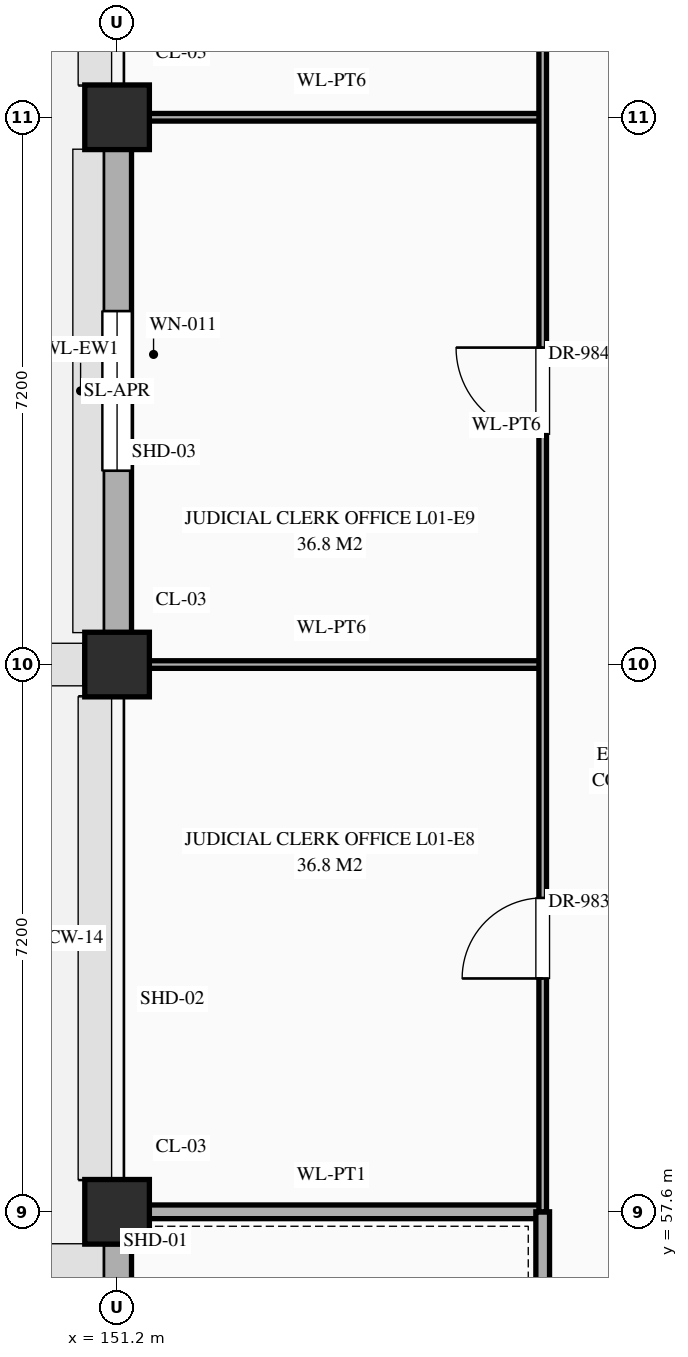
"""IFC4 building model, lengths in metres.
Left out: names, types, materials, properties, quantities, classifications, styles, units other than length and angle.
Written with IfcOpenShell. Run it as: python <this file> out.ifc"""

import sys

from ifc_helpers import new_model, si_unit, direction, frame, frame_2d, origin, origin_2d, place, context, subcontext, project, spatial, rectangle, extrude, element, fill, save


model = new_model("IFC4")
c1 = context("Model", 3, precision=1e-05, world=origin(), true_north=direction((0.0, 1.0)))
c2 = subcontext(c1, "Body", "Model", "MODEL_VIEW")
j1 = project(units=[si_unit("LENGTHUNIT", "METRE"), si_unit("PLANEANGLEUNIT", "RADIAN")], contexts=[c1])
p1 = place(None, origin())
s1 = spatial("IfcSite", under=j1, at=p1, CompositionType="ELEMENT")
p2 = place(p1, origin())
s2 = spatial("IfcBuilding", under=s1, at=p2, CompositionType="ELEMENT")
p3 = place(p2, origin())
s3 = spatial("IfcBuildingStorey", under=s2, at=p3, CompositionType="ELEMENT", Elevation=0.0)
for number, where, z_axis, x_axis in (
    (1, (151.2, 57.6, 0.0), (0.0, 0.0, 1.0), (1.0, 0.0, 0.0)),
    (2, (151.2, 64.8, 0.0), (0.0, 0.0, 1.0), (1.0, 0.0, 0.0)),
    (3, (151.2, 72.0, 0.0), (0.0, 0.0, 1.0), (1.0, 0.0, 0.0)),
):
    element("IfcColumn", number, at=place(p3, frame(where, z_axis=z_axis, x_axis=x_axis)), inside=s3, PredefinedType="COLUMN", context=c2, shape_type="SweptSolid", body=[
        extrude(rectangle(XDim=0.85, YDim=0.85, at=origin_2d()), origin(), (0.0, 0.0, 1.0), 5.4),
    ])
p4 = place(p3, frame((151.2, 50.82, 0.0), z_axis=(0.0, 0.0, 1.0), x_axis=(0.0, 1.0, 0.0)))
e4 = element("IfcWall", 4, at=p4, inside=s3, PredefinedType="STANDARD", context=c2, shape_type="SweptSolid", body=[
    extrude(rectangle(XDim=6.36, YDim=0.38, at=frame_2d((3.18, 0.0))), origin(), (0.0, 0.0, 1.0), 4.47),
])
p5 = place(p4, frame((1.98, 0.0, 0.0)))
e5 = element("IfcOpeningElement", 5, at=p5, cuts=e4, PredefinedType="OPENING", context=c2, shape_type="SweptSolid", body=[
    extrude(rectangle(XDim=2.4, YDim=2.4, at=frame_2d((1.2, 1.2))), frame((0.0, 0.202, 0.0), z_axis=(0.0, -1.0, 0.0), x_axis=(1.0, 0.0, 0.0)), (0.0, 0.0, 1.0), 0.404),
])
p6 = place(p3, frame((151.2, 65.22, 0.0), z_axis=(0.0, 0.0, 1.0), x_axis=(0.0, 1.0, 0.0)))
e6 = element("IfcWall", 6, at=p6, inside=s3, PredefinedType="STANDARD", context=c2, shape_type="SweptSolid", body=[
    extrude(rectangle(XDim=6.36, YDim=0.38, at=frame_2d((3.18, 0.0))), origin(), (0.0, 0.0, 1.0), 4.47),
])
p7 = place(p6, frame((2.13, 0.0, 0.85)))
e7 = element("IfcOpeningElement", 7, at=p7, cuts=e6, PredefinedType="OPENING", context=c2, shape_type="SweptSolid", body=[
    extrude(rectangle(XDim=2.1, YDim=1.2, at=frame_2d((1.05, 0.6))), frame((0.0, 0.202, 0.0), z_axis=(0.0, -1.0, 0.0), x_axis=(1.0, 0.0, 0.0)), (0.0, 0.0, 1.0), 0.404),
])
p8 = place(p3, frame((101.25, 64.8, 0.0), z_axis=(0.0, 0.0, 1.0), x_axis=(1.0, 0.0, 0.0)))
e8 = element("IfcWall", 8, at=p8, inside=s3, PredefinedType="STANDARD", context=c2, shape_type="SweptSolid", body=[
    extrude(rectangle(XDim=49.5, YDim=0.28, at=frame_2d((24.75, 0.0))), origin(), (0.0, 0.0, 1.0), 2.85),
])
p9 = place(p8, frame((13.95, 0.0, 0.0)))
e9 = element("IfcOpeningElement", 9, at=p9, cuts=e8, PredefinedType="OPENING", context=c2, shape_type="SweptSolid", body=[
    extrude(rectangle(XDim=2.4, YDim=2.25, at=frame_2d((1.2, 1.125))), frame((0.0, 0.152, 0.0), z_axis=(0.0, -1.0, 0.0), x_axis=(1.0, 0.0, 0.0)), (0.0, 0.0, 1.0), 0.304),
])
p10 = place(p8, frame((33.15, 0.0, 0.0)))
e10 = element("IfcOpeningElement", 10, at=p10, cuts=e8, PredefinedType="OPENING", context=c2, shape_type="SweptSolid", body=[
    extrude(rectangle(XDim=2.4, YDim=2.25, at=frame_2d((1.2, 1.125))), frame((0.0, 0.152, 0.0), z_axis=(0.0, -1.0, 0.0), x_axis=(1.0, 0.0, 0.0)), (0.0, 0.0, 1.0), 0.304),
])
p11 = place(p3, frame((151.24, 57.6, 0.0), z_axis=(0.0, 0.0, 1.0), x_axis=(1.0, 0.0, 0.0)))
e11 = element("IfcWall", 11, at=p11, inside=s3, PredefinedType="STANDARD", context=c2, shape_type="SweptSolid", body=[
    extrude(rectangle(XDim=5.56, YDim=0.18, at=frame_2d((2.78, 0.0))), origin(), (0.0, 0.0, 1.0), 4.27),
])
for number, where, z_axis, x_axis in (
    (12, (151.24, 64.8, 0.0), (0.0, 0.0, 1.0), (1.0, 0.0, 0.0)),
    (13, (151.24, 72.0, 0.0), (0.0, 0.0, 1.0), (1.0, 0.0, 0.0)),
):
    element("IfcWall", number, at=place(p3, frame(where, z_axis=z_axis, x_axis=x_axis)), inside=s3, PredefinedType="STANDARD", context=c2, shape_type="SweptSolid", body=[
        extrude(rectangle(XDim=5.56, YDim=0.1, at=frame_2d((2.78, 0.0))), origin(), (0.0, 0.0, 1.0), 4.27),
    ])
p12 = place(p3, frame((156.8, 43.2, 0.0), z_axis=(0.0, 0.0, 1.0), x_axis=(0.0, 1.0, 0.0)))
e14 = element("IfcWall", 14, at=p12, inside=s3, PredefinedType="STANDARD", context=c2, shape_type="SweptSolid", body=[
    extrude(rectangle(XDim=14.4, YDim=0.18, at=frame_2d((7.2, 0.0))), origin(), (0.0, 0.0, 1.0), 5.12),
])
p13 = place(p12, frame((2.875, 0.0, 0.0)))
e15 = element("IfcOpeningElement", 15, at=p13, cuts=e14, PredefinedType="OPENING", context=c2, shape_type="SweptSolid", body=[
    extrude(rectangle(XDim=1.45, YDim=2.3, at=frame_2d((0.725, 1.15))), frame((0.0, 0.102, 0.0), z_axis=(0.0, -1.0, 0.0), x_axis=(1.0, 0.0, 0.0)), (0.0, 0.0, 1.0), 0.204),
])
p14 = place(p12, frame((9.85, 0.0, 0.0)))
e16 = element("IfcOpeningElement", 16, at=p14, cuts=e14, PredefinedType="OPENING", context=c2, shape_type="SweptSolid", body=[
    extrude(rectangle(XDim=1.9, YDim=2.5, at=frame_2d((0.95, 1.25))), frame((0.0, 0.102, 0.0), z_axis=(0.0, -1.0, 0.0), x_axis=(1.0, 0.0, 0.0)), (0.0, 0.0, 1.0), 0.204),
])
p15 = place(p3, frame((156.8, 57.6, 0.0), z_axis=(0.0, 0.0, 1.0), x_axis=(0.0, 1.0, 0.0)))
e17 = element("IfcWall", 17, at=p15, inside=s3, PredefinedType="STANDARD", context=c2, shape_type="SweptSolid", body=[
    extrude(rectangle(XDim=26.4, YDim=0.1, at=frame_2d((13.2, 0.0))), origin(), (0.0, 0.0, 1.0), 5.12),
])
p16 = place(p15, frame((23.38, 0.0, 0.0)))
e18 = element("IfcOpeningElement", 18, at=p16, cuts=e17, PredefinedType="OPENING", context=c2, shape_type="SweptSolid", body=[
    extrude(rectangle(XDim=1.24, YDim=2.3, at=frame_2d((0.62, 1.15))), frame((0.0, 0.062, 0.0), z_axis=(0.0, -1.0, 0.0), x_axis=(1.0, 0.0, 0.0)), (0.0, 0.0, 1.0), 0.124),
])
p17 = place(p15, frame((3.07, 0.0, 0.0)))
e19 = element("IfcOpeningElement", 19, at=p17, cuts=e17, PredefinedType="OPENING", context=c2, shape_type="SweptSolid", body=[
    extrude(rectangle(XDim=1.06, YDim=2.4, at=frame_2d((0.53, 1.2))), frame((0.0, 0.062, 0.0), z_axis=(0.0, -1.0, 0.0), x_axis=(1.0, 0.0, 0.0)), (0.0, 0.0, 1.0), 0.124),
])
p18 = place(p15, frame((10.23, 0.0, 0.0)))
e20 = element("IfcOpeningElement", 20, at=p18, cuts=e17, PredefinedType="OPENING", context=c2, shape_type="SweptSolid", body=[
    extrude(rectangle(XDim=1.14, YDim=2.4, at=frame_2d((0.57, 1.2))), frame((0.0, 0.062, 0.0), z_axis=(0.0, -1.0, 0.0), x_axis=(1.0, 0.0, 0.0)), (0.0, 0.0, 1.0), 0.124),
])
p19 = place(p15, frame((17.55, 0.0, 0.0)))
e21 = element("IfcOpeningElement", 21, at=p19, cuts=e17, PredefinedType="OPENING", context=c2, shape_type="SweptSolid", body=[
    extrude(rectangle(XDim=0.9, YDim=2.15, at=frame_2d((0.45, 1.075))), frame((0.0, 0.062, 0.0), z_axis=(0.0, -1.0, 0.0), x_axis=(1.0, 0.0, 0.0)), (0.0, 0.0, 1.0), 0.124),
])
p20 = place(p7, origin())
e22 = element("IfcWindow", 22, at=p20, inside=s3, PartitioningType="SINGLE_PANEL", PredefinedType="WINDOW", context=c2, shape_type="SweptSolid", body=[
    extrude(rectangle(XDim=2.1, YDim=1.2, at=frame_2d((1.05, 0.6))), frame((0.0, 0.03, 0.0), z_axis=(0.0, -1.0, 0.0), x_axis=(1.0, 0.0, 0.0)), (0.0, 0.0, 1.0), 0.06),
])
fill(e7, e22)
p21 = place(p17, origin())
e23 = element("IfcDoor", 23, at=p21, inside=s3, OperationType="SINGLE_SWING_LEFT", PredefinedType="DOOR", context=c2, shape_type="SweptSolid", body=[
    extrude(rectangle(XDim=1.06, YDim=2.4, at=frame_2d((0.53, 1.2))), frame((0.0, 0.025, 0.0), z_axis=(0.0, -1.0, 0.0), x_axis=(1.0, 0.0, 0.0)), (0.0, 0.0, 1.0), 0.05),
])
fill(e19, e23)
p22 = place(p18, origin())
e24 = element("IfcDoor", 24, at=p22, inside=s3, OperationType="SINGLE_SWING_RIGHT", PredefinedType="DOOR", context=c2, shape_type="SweptSolid", body=[
    extrude(rectangle(XDim=1.14, YDim=2.4, at=frame_2d((0.57, 1.2))), frame((0.0, 0.025, 0.0), z_axis=(0.0, -1.0, 0.0), x_axis=(1.0, 0.0, 0.0)), (0.0, 0.0, 1.0), 0.05),
])
fill(e20, e24)
save(model, sys.argv[1])
